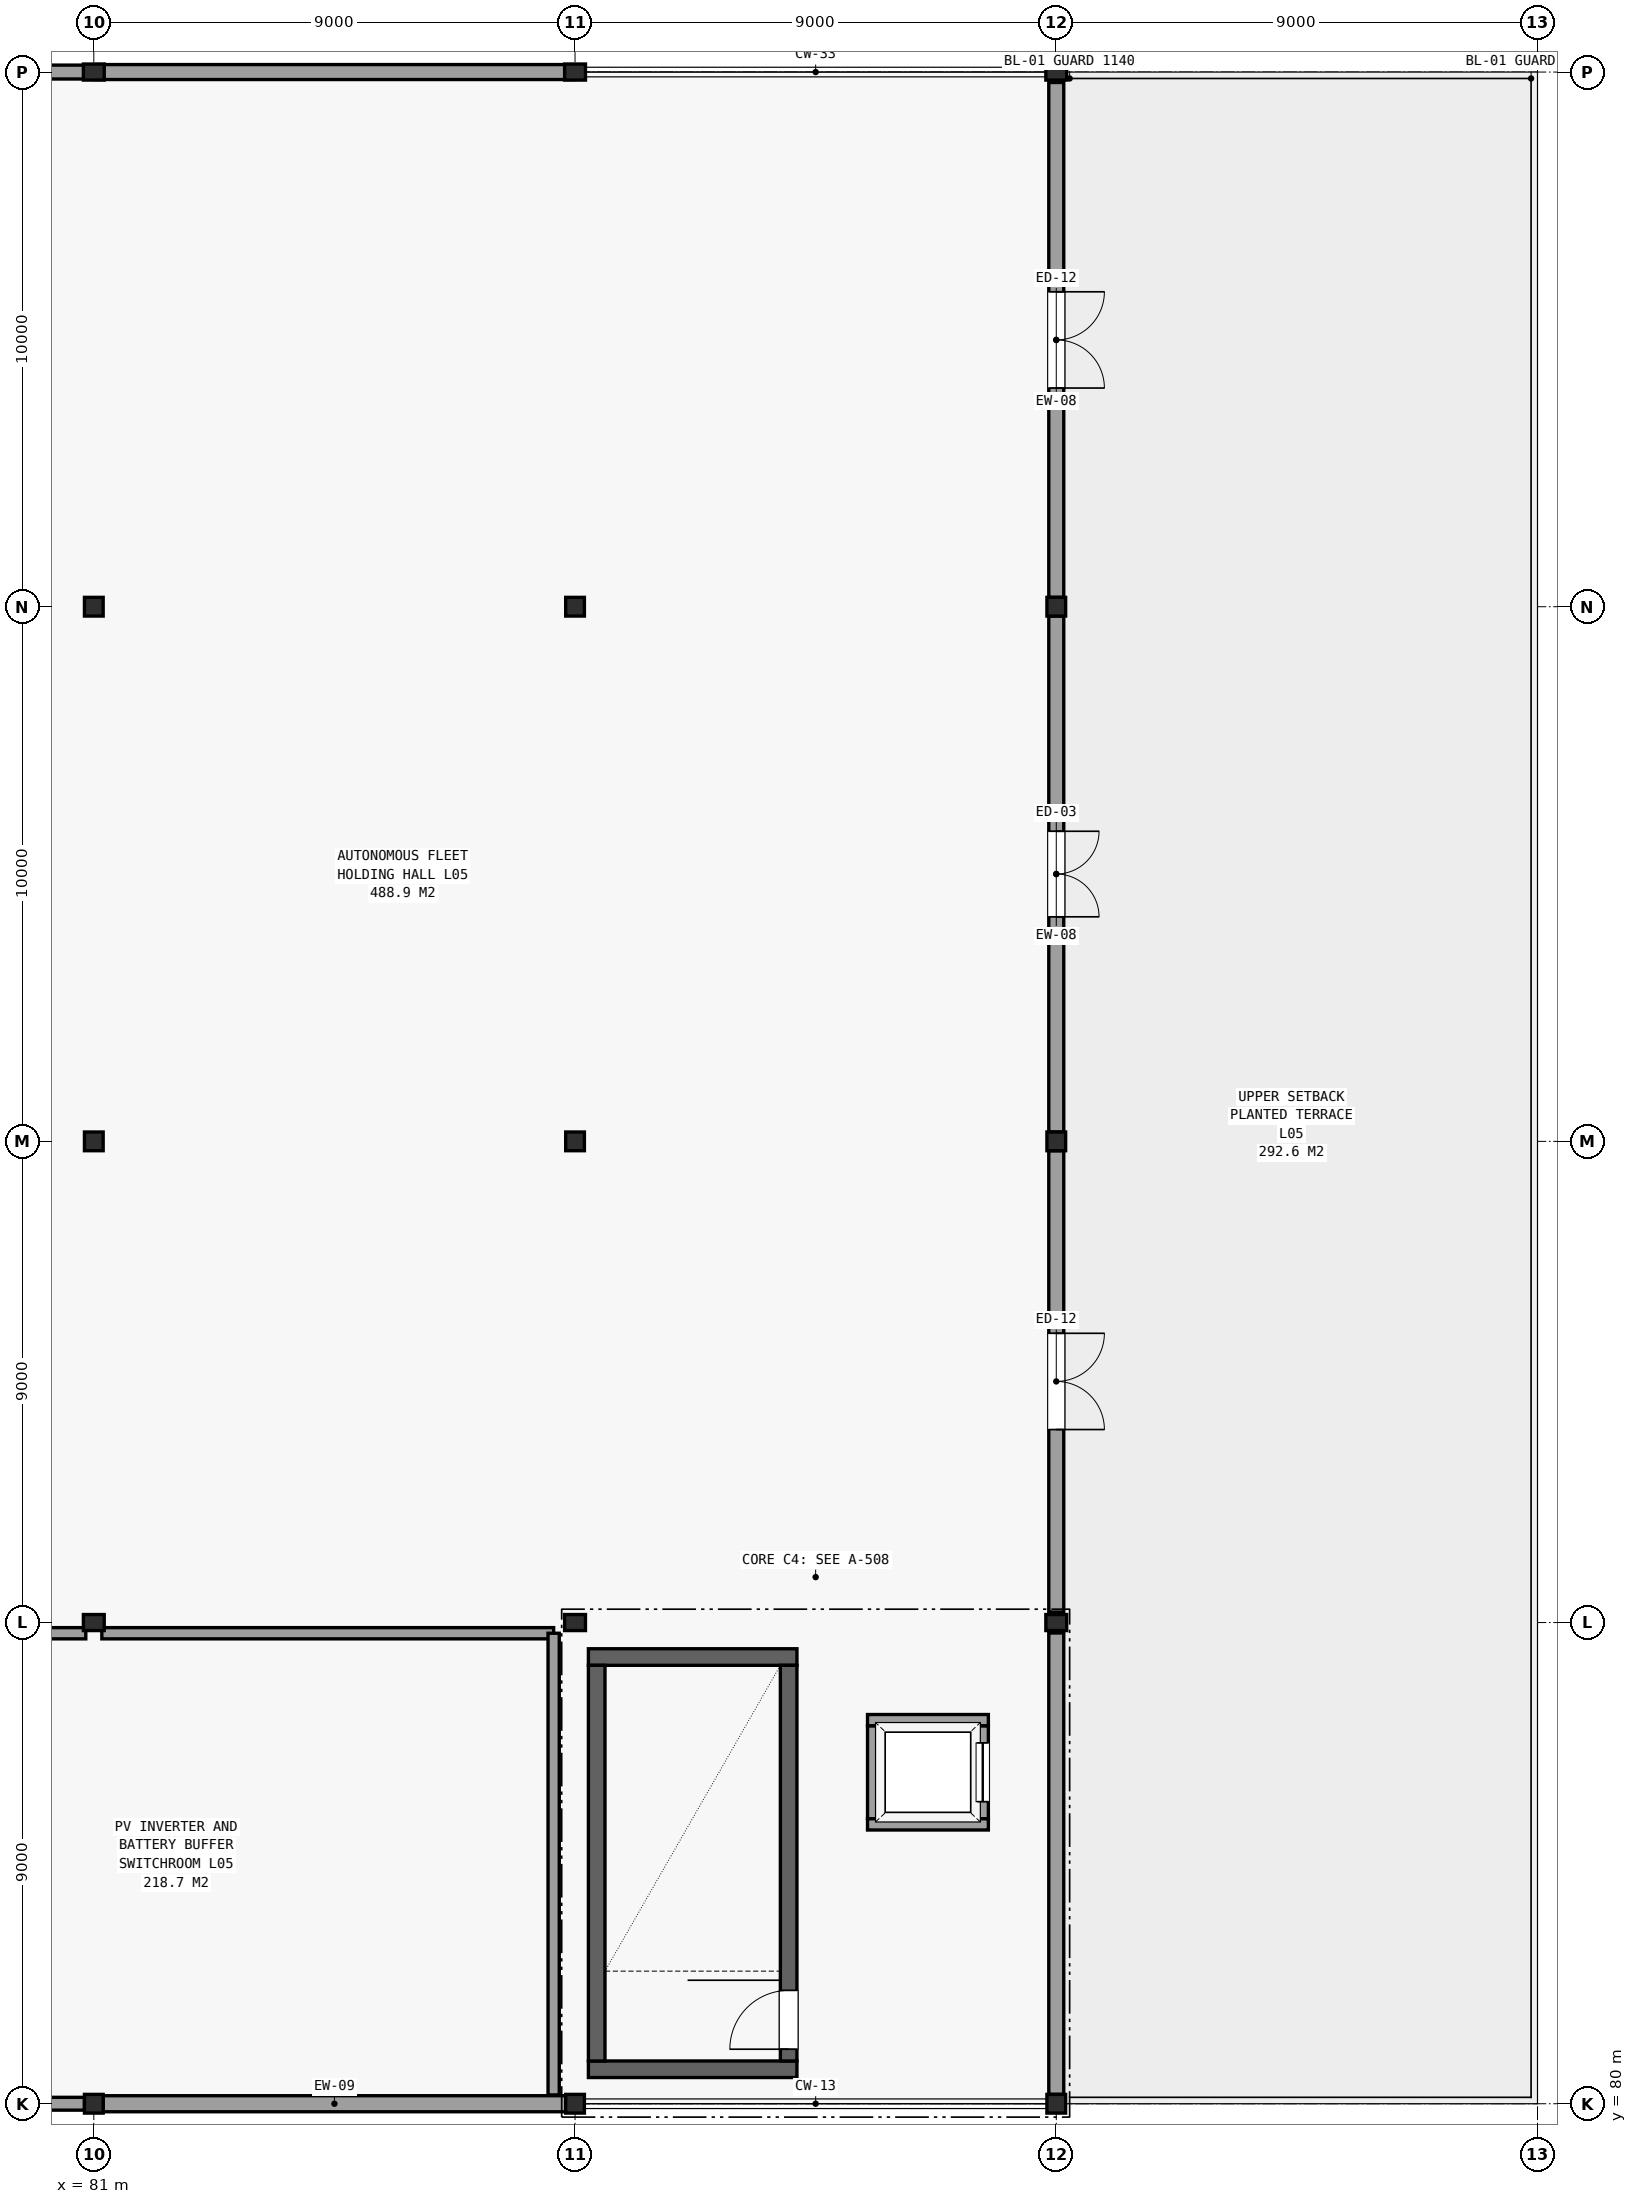
"""IFC4 building model, lengths in metres.
Left out: names, types, materials, properties, quantities, classifications, styles, units other than length and angle.
Written with IfcOpenShell. Run it as: python <this file> out.ifc"""

import sys

from ifc_helpers import new_model, si_unit, direction, frame, frame_2d, origin, origin_2d, place, context, subcontext, project, spatial, rectangle, hollow_rectangle, i_section, extrude, element, fill, save


model = new_model("IFC4")
c1 = context("Model", 3, precision=1e-05, world=origin(), true_north=direction((0.0, 1.0)))
c2 = subcontext(c1, "Body", "Model", "MODEL_VIEW")
j1 = project(units=[si_unit("LENGTHUNIT", "METRE"), si_unit("PLANEANGLEUNIT", "RADIAN")], contexts=[c1])
p1 = place(None, origin())
s1 = spatial("IfcSite", under=j1, at=p1, CompositionType="ELEMENT")
p2 = place(p1, origin())
s2 = spatial("IfcBuilding", under=s1, at=p2, CompositionType="ELEMENT")
p3 = place(p2, frame((0.0, 0.0, 21.9)))
s3 = spatial("IfcBuildingStorey", under=s2, at=p3, CompositionType="ELEMENT", Elevation=21.9)
p4 = place(p3, frame((81.0, 80.0, 0.0), z_axis=(0.0, 0.0, 1.0), x_axis=(1.0, 0.0, 0.0)))
e1 = element("IfcColumn", 1, at=p4, inside=s3, PredefinedType="COLUMN", context=c2, shape_type="SweptSolid", body=[
    extrude(hollow_rectangle(XDim=0.35, YDim=0.35, WallThickness=0.016, at=origin_2d()), origin(), (0.0, 0.0, 1.0), 4.14),
])
p5 = place(p3, frame((81.0, 89.0, 0.0), z_axis=(0.0, 0.0, 1.0), x_axis=(1.0, 0.0, 0.0)))
e2 = element("IfcColumn", 2, at=p5, inside=s3, PredefinedType="COLUMN", context=c2, shape_type="SweptSolid", body=[
    extrude(i_section(OverallWidth=0.3, OverallDepth=0.39, WebThickness=0.01, FlangeThickness=0.016, FilletRadius=0.013, at=origin_2d()), origin(), (0.0, 0.0, 1.0), 4.14),
])
for number, where, z_axis, x_axis in (
    (3, (81.0, 98.0, 0.0), (0.0, 0.0, 1.0), (1.0, 0.0, 0.0)),
    (4, (81.0, 108.0, 0.0), (0.0, 0.0, 1.0), (1.0, 0.0, 0.0)),
):
    element("IfcColumn", number, at=place(p3, frame(where, z_axis=z_axis, x_axis=x_axis)), inside=s3, PredefinedType="COLUMN", context=c2, shape_type="SweptSolid", body=[
        extrude(hollow_rectangle(XDim=0.35, YDim=0.35, WallThickness=0.016, at=origin_2d()), origin(), (0.0, 0.0, 1.0), 4.14),
    ])
p6 = place(p3, frame((81.0, 118.0, 0.0), z_axis=(0.0, 0.0, 1.0), x_axis=(1.0, 0.0, 0.0)))
e5 = element("IfcColumn", 5, at=p6, inside=s3, PredefinedType="COLUMN", context=c2, shape_type="SweptSolid", body=[
    extrude(i_section(OverallWidth=0.3, OverallDepth=0.39, WebThickness=0.01, FlangeThickness=0.016, FilletRadius=0.013, at=origin_2d()), origin(), (0.0, 0.0, 1.0), 4.14),
])
p7 = place(p3, frame((90.0, 80.0, 0.0), z_axis=(0.0, 0.0, 1.0), x_axis=(1.0, 0.0, 0.0)))
e6 = element("IfcColumn", 6, at=p7, inside=s3, PredefinedType="COLUMN", context=c2, shape_type="SweptSolid", body=[
    extrude(hollow_rectangle(XDim=0.35, YDim=0.35, WallThickness=0.016, at=origin_2d()), origin(), (0.0, 0.0, 1.0), 4.14),
])
p8 = place(p3, frame((90.0, 89.0, 0.0), z_axis=(0.0, 0.0, 1.0), x_axis=(1.0, 0.0, 0.0)))
e7 = element("IfcColumn", 7, at=p8, inside=s3, PredefinedType="COLUMN", context=c2, shape_type="SweptSolid", body=[
    extrude(i_section(OverallWidth=0.3, OverallDepth=0.39, WebThickness=0.01, FlangeThickness=0.016, FilletRadius=0.013, at=origin_2d()), origin(), (0.0, 0.0, 1.0), 4.14),
])
for number, where, z_axis, x_axis in (
    (8, (90.0, 98.0, 0.0), (0.0, 0.0, 1.0), (1.0, 0.0, 0.0)),
    (9, (90.0, 108.0, 0.0), (0.0, 0.0, 1.0), (1.0, 0.0, 0.0)),
):
    element("IfcColumn", number, at=place(p3, frame(where, z_axis=z_axis, x_axis=x_axis)), inside=s3, PredefinedType="COLUMN", context=c2, shape_type="SweptSolid", body=[
        extrude(hollow_rectangle(XDim=0.35, YDim=0.35, WallThickness=0.016, at=origin_2d()), origin(), (0.0, 0.0, 1.0), 4.14),
    ])
p9 = place(p3, frame((90.0, 118.0, 0.0), z_axis=(0.0, 0.0, 1.0), x_axis=(1.0, 0.0, 0.0)))
e10 = element("IfcColumn", 10, at=p9, inside=s3, PredefinedType="COLUMN", context=c2, shape_type="SweptSolid", body=[
    extrude(i_section(OverallWidth=0.3, OverallDepth=0.39, WebThickness=0.01, FlangeThickness=0.016, FilletRadius=0.013, at=origin_2d()), origin(), (0.0, 0.0, 1.0), 4.14),
])
p10 = place(p3, frame((99.0, 80.0, 0.0), z_axis=(0.0, 0.0, 1.0), x_axis=(1.0, 0.0, 0.0)))
e11 = element("IfcColumn", 11, at=p10, inside=s3, PredefinedType="COLUMN", context=c2, shape_type="SweptSolid", body=[
    extrude(hollow_rectangle(XDim=0.35, YDim=0.35, WallThickness=0.016, at=origin_2d()), origin(), (0.0, 0.0, 1.0), 4.14),
])
p11 = place(p3, frame((99.0, 89.0, 0.0), z_axis=(0.0, 0.0, 1.0), x_axis=(1.0, 0.0, 0.0)))
e12 = element("IfcColumn", 12, at=p11, inside=s3, PredefinedType="COLUMN", context=c2, shape_type="SweptSolid", body=[
    extrude(i_section(OverallWidth=0.3, OverallDepth=0.39, WebThickness=0.01, FlangeThickness=0.016, FilletRadius=0.013, at=origin_2d()), origin(), (0.0, 0.0, 1.0), 4.14),
])
for number, where, z_axis, x_axis in (
    (13, (99.0, 98.0, 0.0), (0.0, 0.0, 1.0), (1.0, 0.0, 0.0)),
    (14, (99.0, 108.0, 0.0), (0.0, 0.0, 1.0), (1.0, 0.0, 0.0)),
):
    element("IfcColumn", number, at=place(p3, frame(where, z_axis=z_axis, x_axis=x_axis)), inside=s3, PredefinedType="COLUMN", context=c2, shape_type="SweptSolid", body=[
        extrude(hollow_rectangle(XDim=0.35, YDim=0.35, WallThickness=0.016, at=origin_2d()), origin(), (0.0, 0.0, 1.0), 4.14),
    ])
p12 = place(p3, frame((99.0, 118.0, 0.0), z_axis=(0.0, 0.0, 1.0), x_axis=(1.0, 0.0, 0.0)))
e15 = element("IfcColumn", 15, at=p12, inside=s3, PredefinedType="COLUMN", context=c2, shape_type="SweptSolid", body=[
    extrude(i_section(OverallWidth=0.3, OverallDepth=0.39, WebThickness=0.01, FlangeThickness=0.016, FilletRadius=0.013, at=origin_2d()), origin(), (0.0, 0.0, 1.0), 4.14),
])
p13 = place(p3, frame((72.004, 80.0, 0.0), z_axis=(0.0, 0.0, 1.0), x_axis=(1.0, 0.0, 0.0)))
e16 = element("IfcWall", 16, at=p13, inside=s3, PredefinedType="SOLIDWALL", context=c2, shape_type="SweptSolid", body=[
    extrude(rectangle(XDim=8.821, YDim=0.24, at=frame_2d((4.41, 0.0))), origin(), (0.0, 0.0, 1.0), 3.22),
])
p14 = place(p3, frame((81.175, 80.0, 0.0), z_axis=(0.0, 0.0, 1.0), x_axis=(1.0, 0.0, 0.0)))
e17 = element("IfcWall", 17, at=p14, inside=s3, PredefinedType="SOLIDWALL", context=c2, shape_type="SweptSolid", body=[
    extrude(rectangle(XDim=8.65, YDim=0.3, at=frame_2d((4.325, 0.0))), origin(), (0.0, 0.0, 1.0), 3.22),
])
p15 = place(p3, frame((99.0, 80.175, 0.0), z_axis=(0.0, 0.0, 1.0), x_axis=(0.0, 1.0, 0.0)))
e18 = element("IfcWall", 18, at=p15, inside=s3, PredefinedType="SOLIDWALL", context=c2, shape_type="SweptSolid", body=[
    extrude(rectangle(XDim=8.63, YDim=0.28, at=frame_2d((4.315, 0.0))), origin(), (0.0, 0.0, 1.0), 3.22),
])
p16 = place(p3, frame((99.0, 89.195, 0.0), z_axis=(0.0, 0.0, 1.0), x_axis=(0.0, 1.0, 0.0)))
e19 = element("IfcWall", 19, at=p16, inside=s3, PredefinedType="SOLIDWALL", context=c2, shape_type="SweptSolid", body=[
    extrude(rectangle(XDim=8.63, YDim=0.28, at=frame_2d((4.315, 0.0))), origin(), (0.0, 0.0, 1.0), 3.22),
])
p17 = place(p16, frame((5.215, 0.0, 0.0), z_axis=(0.0, 0.0, 1.0), x_axis=(-1.0, 0.0, 0.0)))
e20 = element("IfcOpeningElement", 20, at=p17, cuts=e19, PredefinedType="OPENING", context=c2, shape_type="SweptSolid", body=[
    extrude(rectangle(XDim=1.8, YDim=2.2, at=frame_2d((0.9, 1.1))), frame((0.0, 0.151, 0.0), z_axis=(0.0, -1.0, 0.0), x_axis=(1.0, 0.0, 0.0)), (0.0, 0.0, 1.0), 0.302),
])
p18 = place(p3, frame((99.0, 98.175, 0.0), z_axis=(0.0, 0.0, 1.0), x_axis=(0.0, 1.0, 0.0)))
e21 = element("IfcWall", 21, at=p18, inside=s3, PredefinedType="SOLIDWALL", context=c2, shape_type="SweptSolid", body=[
    extrude(rectangle(XDim=9.65, YDim=0.28, at=frame_2d((4.825, 0.0))), origin(), (0.0, 0.0, 1.0), 3.22),
])
p19 = place(p18, frame((5.625, 0.0, 0.0), z_axis=(0.0, 0.0, 1.0), x_axis=(-1.0, 0.0, 0.0)))
e22 = element("IfcOpeningElement", 22, at=p19, cuts=e21, PredefinedType="OPENING", context=c2, shape_type="SweptSolid", body=[
    extrude(rectangle(XDim=1.6, YDim=2.2, at=frame_2d((0.8, 1.1))), frame((0.0, 0.151, 0.0), z_axis=(0.0, -1.0, 0.0), x_axis=(1.0, 0.0, 0.0)), (0.0, 0.0, 1.0), 0.302),
])
p20 = place(p3, frame((99.0, 108.175, 0.0), z_axis=(0.0, 0.0, 1.0), x_axis=(0.0, 1.0, 0.0)))
e23 = element("IfcWall", 23, at=p20, inside=s3, PredefinedType="SOLIDWALL", context=c2, shape_type="SweptSolid", body=[
    extrude(rectangle(XDim=9.63, YDim=0.28, at=frame_2d((4.815, 0.0))), origin(), (0.0, 0.0, 1.0), 3.22),
])
p21 = place(p20, frame((5.715, 0.0, 0.0), z_axis=(0.0, 0.0, 1.0), x_axis=(-1.0, 0.0, 0.0)))
e24 = element("IfcOpeningElement", 24, at=p21, cuts=e23, PredefinedType="OPENING", context=c2, shape_type="SweptSolid", body=[
    extrude(rectangle(XDim=1.8, YDim=2.2, at=frame_2d((0.9, 1.1))), frame((0.0, 0.151, 0.0), z_axis=(0.0, -1.0, 0.0), x_axis=(1.0, 0.0, 0.0)), (0.0, 0.0, 1.0), 0.302),
])
p22 = place(p3, frame((89.996, 118.0, 0.0), z_axis=(0.0, 0.0, 1.0), x_axis=(-1.0, 0.0, 0.0)))
e25 = element("IfcWall", 25, at=p22, inside=s3, PredefinedType="SOLIDWALL", context=c2, shape_type="SweptSolid", body=[
    extrude(rectangle(XDim=8.991, YDim=0.28, at=frame_2d((4.496, 0.0))), origin(), (0.0, 0.0, 1.0), 3.22),
])
p23 = place(p3, frame((80.996, 118.0, 0.0), z_axis=(0.0, 0.0, 1.0), x_axis=(-1.0, 0.0, 0.0)))
e26 = element("IfcWall", 26, at=p23, inside=s3, PredefinedType="SOLIDWALL", context=c2, shape_type="SweptSolid", body=[
    extrude(rectangle(XDim=8.821, YDim=0.26, at=frame_2d((4.41, 0.0))), origin(), (0.0, 0.0, 1.0), 3.22),
])
for number, where, z_axis, x_axis in (
    (27, (90.25, 80.645, 0.0), (0.0, 0.0, 1.0), (1.0, 0.0, 0.0)),
    (28, (90.25, 88.355, 0.0), (0.0, 0.0, 1.0), (1.0, 0.0, 0.0)),
):
    element("IfcWall", number, at=place(p3, frame(where, z_axis=z_axis, x_axis=x_axis)), inside=s3, PredefinedType="SHEAR", context=c2, shape_type="SweptSolid", body=[
        extrude(rectangle(XDim=3.9, YDim=0.31, at=frame_2d((1.95, 0.0))), origin(), (0.0, 0.0, 1.0), 3.92),
    ])
p24 = place(p3, frame((90.405, 80.8, 0.0), z_axis=(0.0, 0.0, 1.0), x_axis=(0.0, 1.0, 0.0)))
e29 = element("IfcWall", 29, at=p24, inside=s3, PredefinedType="SHEAR", context=c2, shape_type="SweptSolid", body=[
    extrude(rectangle(XDim=7.4, YDim=0.31, at=frame_2d((3.7, 0.0))), origin(), (0.0, 0.0, 1.0), 3.92),
])
p25 = place(p3, frame((93.995, 80.8, 0.0), z_axis=(0.0, 0.0, 1.0), x_axis=(0.0, 1.0, 0.0)))
e30 = element("IfcWall", 30, at=p25, inside=s3, PredefinedType="SHEAR", context=c2, shape_type="SweptSolid", body=[
    extrude(rectangle(XDim=7.4, YDim=0.31, at=frame_2d((3.7, 0.0))), origin(), (0.0, 0.0, 1.0), 3.92),
])
p26 = place(p25, frame((0.22, 0.0, 0.0)))
e31 = element("IfcOpeningElement", 31, at=p26, cuts=e30, PredefinedType="OPENING", context=c2, shape_type="SweptSolid", body=[
    extrude(rectangle(XDim=1.1, YDim=2.15, at=frame_2d((0.55, 1.075))), frame((0.0, 0.166, 0.0), z_axis=(0.0, -1.0, 0.0), x_axis=(1.0, 0.0, 0.0)), (0.0, 0.0, 1.0), 0.332),
])
p27 = place(p3, frame((97.625, 85.33, 0.0), z_axis=(0.0, 0.0, 1.0), x_axis=(0.0, 1.0, 0.0)))
e32 = element("IfcWall", 32, at=p27, inside=s3, PredefinedType="PARTITIONING", context=c2, shape_type="SweptSolid", body=[
    extrude(rectangle(XDim=1.74, YDim=0.21, at=frame_2d((0.87, 0.0))), origin(), (0.0, 0.0, 1.0), 3.92),
])
p28 = place(p27, frame((0.32, 0.0, 0.0)))
e33 = element("IfcOpeningElement", 33, at=p28, cuts=e32, PredefinedType="OPENING", context=c2, shape_type="SweptSolid", body=[
    extrude(rectangle(XDim=1.1, YDim=2.15, at=frame_2d((0.55, 1.075))), frame((0.0, 0.116, 0.0), z_axis=(0.0, -1.0, 0.0), x_axis=(1.0, 0.0, 0.0)), (0.0, 0.0, 1.0), 0.232),
])
p29 = place(p3, frame((95.575, 85.33, 0.0), z_axis=(0.0, 0.0, 1.0), x_axis=(0.0, 1.0, 0.0)))
e34 = element("IfcWall", 34, at=p29, inside=s3, PredefinedType="PARTITIONING", context=c2, shape_type="SweptSolid", body=[
    extrude(rectangle(XDim=1.74, YDim=0.21, at=frame_2d((0.87, 0.0))), origin(), (0.0, 0.0, 1.0), 3.92),
])
for number, where, z_axis, x_axis in (
    (35, (95.47, 85.225, 0.0), (0.0, 0.0, 1.0), (1.0, 0.0, 0.0)),
    (36, (95.47, 87.175, 0.0), (0.0, 0.0, 1.0), (1.0, 0.0, 0.0)),
):
    element("IfcWall", number, at=place(p3, frame(where, z_axis=z_axis, x_axis=x_axis)), inside=s3, PredefinedType="PARTITIONING", context=c2, shape_type="SweptSolid", body=[
        extrude(rectangle(XDim=2.26, YDim=0.21, at=frame_2d((1.13, 0.0))), origin(), (0.0, 0.0, 1.0), 3.92),
    ])
p30 = place(p3, frame((72.175, 88.8, 0.0), z_axis=(0.0, 0.0, 1.0), x_axis=(1.0, 0.0, 0.0)))
e37 = element("IfcWall", 37, at=p30, inside=s3, PredefinedType="PARTITIONING", context=c2, shape_type="SweptSolid", body=[
    extrude(rectangle(XDim=8.675, YDim=0.21, at=frame_2d((4.337, 0.0))), origin(), (0.0, 0.0, 1.0), 3.22),
])
p31 = place(p30, frame((3.625, 0.0, 0.0)))
e38 = element("IfcOpeningElement", 38, at=p31, cuts=e37, PredefinedType="OPENING", context=c2, shape_type="SweptSolid", body=[
    extrude(rectangle(XDim=1.4, YDim=2.2, at=frame_2d((0.7, 1.1))), frame((0.0, 0.116, 0.0), z_axis=(0.0, -1.0, 0.0), x_axis=(1.0, 0.0, 0.0)), (0.0, 0.0, 1.0), 0.232),
])
p32 = place(p3, frame((81.15, 88.8, 0.0), z_axis=(0.0, 0.0, 1.0), x_axis=(1.0, 0.0, 0.0)))
e39 = element("IfcWall", 39, at=p32, inside=s3, PredefinedType="PARTITIONING", context=c2, shape_type="SweptSolid", body=[
    extrude(rectangle(XDim=8.45, YDim=0.21, at=frame_2d((4.225, 0.0))), origin(), (0.0, 0.0, 1.0), 3.22),
])
p33 = place(p3, frame((89.6, 80.165, 0.0), z_axis=(0.0, 0.0, 1.0), x_axis=(0.0, 1.0, 0.0)))
e40 = element("IfcWall", 40, at=p33, inside=s3, PredefinedType="PARTITIONING", context=c2, shape_type="SweptSolid", body=[
    extrude(rectangle(XDim=8.635, YDim=0.21, at=frame_2d((4.317, 0.0))), origin(), (0.0, 0.0, 1.0), 3.332),
])
p34 = place(p17, origin())
e41 = element("IfcDoor", 41, at=p34, inside=s3, OperationType="SINGLE_SWING_LEFT", PredefinedType="DOOR", context=c2, shape_type="SweptSolid", body=[
    extrude(rectangle(XDim=1.8, YDim=2.2, at=frame_2d((0.9, 1.1))), frame((0.0, 0.025, 0.0), z_axis=(0.0, -1.0, 0.0), x_axis=(1.0, 0.0, 0.0)), (0.0, 0.0, 1.0), 0.05),
])
fill(e20, e41)
p35 = place(p19, origin())
e42 = element("IfcDoor", 42, at=p35, inside=s3, OperationType="SINGLE_SWING_LEFT", PredefinedType="DOOR", context=c2, shape_type="SweptSolid", body=[
    extrude(rectangle(XDim=1.6, YDim=2.2, at=frame_2d((0.8, 1.1))), frame((0.0, 0.025, 0.0), z_axis=(0.0, -1.0, 0.0), x_axis=(1.0, 0.0, 0.0)), (0.0, 0.0, 1.0), 0.05),
])
fill(e22, e42)
p36 = place(p21, origin())
e43 = element("IfcDoor", 43, at=p36, inside=s3, OperationType="SINGLE_SWING_LEFT", PredefinedType="DOOR", context=c2, shape_type="SweptSolid", body=[
    extrude(rectangle(XDim=1.8, YDim=2.2, at=frame_2d((0.9, 1.1))), frame((0.0, 0.025, 0.0), z_axis=(0.0, -1.0, 0.0), x_axis=(1.0, 0.0, 0.0)), (0.0, 0.0, 1.0), 0.05),
])
fill(e24, e43)
p37 = place(p26, origin())
e44 = element("IfcDoor", 44, at=p37, inside=s3, OperationType="SINGLE_SWING_LEFT", PredefinedType="DOOR", context=c2, shape_type="SweptSolid", body=[
    extrude(rectangle(XDim=1.1, YDim=2.15, at=frame_2d((0.55, 1.075))), frame((0.0, 0.025, 0.0), z_axis=(0.0, -1.0, 0.0), x_axis=(1.0, 0.0, 0.0)), (0.0, 0.0, 1.0), 0.05),
])
fill(e31, e44)
p38 = place(p28, origin())
e45 = element("IfcDoor", 45, at=p38, inside=s3, OperationType="SLIDING_TO_LEFT", PredefinedType="DOOR", context=c2, shape_type="SweptSolid", body=[
    extrude(rectangle(XDim=1.1, YDim=2.15, at=frame_2d((0.55, 1.075))), frame((0.0, 0.025, 0.0), z_axis=(0.0, -1.0, 0.0), x_axis=(1.0, 0.0, 0.0)), (0.0, 0.0, 1.0), 0.05),
])
fill(e33, e45)
save(model, sys.argv[1])
